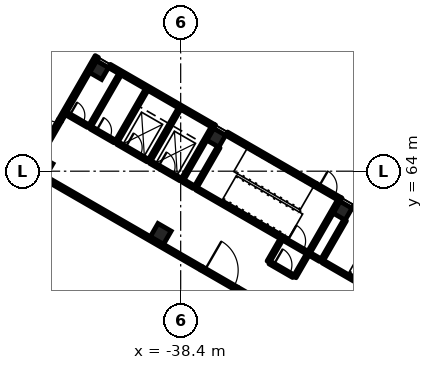
"""IFC4 building model, lengths in metres.
Left out: names, types, materials, properties, quantities, classifications, styles, units other than length and angle.
Written with IfcOpenShell. Run it as: python <this file> out.ifc"""

import sys

from ifc_helpers import new_model, si_unit, direction, frame, frame_2d, origin, origin_2d, place, context, subcontext, project, spatial, rectangle, extrude, element, fill, save


model = new_model("IFC4")
c1 = context("Model", 3, precision=1e-05, world=origin(), true_north=direction((0.0, 1.0)))
c2 = subcontext(c1, "Body", "Model", "MODEL_VIEW")
j1 = project(units=[si_unit("LENGTHUNIT", "METRE"), si_unit("PLANEANGLEUNIT", "RADIAN")], contexts=[c1])
p1 = place(None, origin())
s1 = spatial("IfcSite", under=j1, at=p1, CompositionType="ELEMENT")
p2 = place(p1, origin())
s2 = spatial("IfcBuilding", under=s1, at=p2, CompositionType="ELEMENT")
p3 = place(p2, origin())
s3 = spatial("IfcBuildingStorey", under=s2, at=p3, CompositionType="ELEMENT", Elevation=0.0)
for number, where, z_axis, x_axis in (
    (1, (-27.746, 61.399, -0.3), (0.0, 0.0, 1.0), (-0.5, -0.866, 0.0)),
    (2, (-36.06, 66.199, -0.3), (0.0, 0.0, 1.0), (-0.5, -0.866, 0.0)),
    (3, (-43.767, 70.649, -0.3), (0.0, 0.0, 1.0), (-0.5, -0.866, 0.0)),
):
    element("IfcColumn", number, at=place(p3, frame(where, z_axis=z_axis, x_axis=x_axis)), inside=s3, PredefinedType="COLUMN", context=c2, shape_type="SweptSolid", body=[
        extrude(rectangle(XDim=0.9, YDim=0.9, at=origin_2d()), origin(), (0.0, 0.0, 1.0), 6.3),
    ])
p4 = place(p3, frame((-39.71, 59.877, -0.3), z_axis=(0.0, 0.0, 1.0), x_axis=(-0.5, -0.866025403784, 0.0)))
e4 = element("IfcColumn", 4, at=p4, inside=s3, PredefinedType="COLUMN", context=c2, shape_type="SweptSolid", body=[
    extrude(rectangle(XDim=1.0, YDim=1.0, at=origin_2d()), origin(), (0.0, 0.0, 1.0), 6.3),
])
p5 = place(p3, frame((-47.417, 64.327, -0.3), z_axis=(0.0, 0.0, 1.0), x_axis=(-0.5, -0.866025403784, 0.0)))
e5 = element("IfcColumn", 5, at=p5, inside=s3, PredefinedType="COLUMN", context=c2, shape_type="SweptSolid", body=[
    extrude(rectangle(XDim=0.9, YDim=0.9, at=origin_2d()), origin(), (0.0, 0.0, 1.0), 6.3),
])
p6 = place(p3, frame((-36.719, 65.857, -1.5), z_axis=(0.0, 0.0, 1.0), x_axis=(-0.866020664882, 0.50000820793, 0.0)))
e6 = element("IfcWall", 6, at=p6, inside=s3, PredefinedType="SOLIDWALL", context=c2, shape_type="SweptSolid", body=[
    extrude(rectangle(XDim=5.3, YDim=0.25, at=frame_2d((2.65, 0.0))), origin(), (0.0, 0.0, 1.0), 1.2),
])
p7 = place(p3, frame((-38.194, 63.303, -1.5), z_axis=(0.0, 0.0, 1.0), x_axis=(-0.866029095148, 0.499993606316, 0.0)))
e7 = element("IfcWall", 7, at=p7, inside=s3, PredefinedType="SOLIDWALL", context=c2, shape_type="SweptSolid", body=[
    extrude(rectangle(XDim=5.3, YDim=0.25, at=frame_2d((2.65, 0.0))), origin(), (0.0, 0.0, 1.0), 1.2),
])
p8 = place(p3, frame((-36.889, 65.812, -1.5), z_axis=(0.0, 0.0, 1.0), x_axis=(-0.4999416173, -0.866059108428, 0.0)))
e8 = element("IfcWall", 8, at=p8, inside=s3, PredefinedType="SOLIDWALL", context=c2, shape_type="SweptSolid", body=[
    extrude(rectangle(XDim=2.7, YDim=0.25, at=frame_2d((1.35, 0.0))), origin(), (0.0, 0.0, 1.0), 1.2),
])
p9 = place(p3, frame((-41.263, 68.337, -1.5), z_axis=(0.0, 0.0, 1.0), x_axis=(-0.50000943426, -0.866019956843, 0.0)))
e9 = element("IfcWall", 9, at=p9, inside=s3, PredefinedType="SOLIDWALL", context=c2, shape_type="SweptSolid", body=[
    extrude(rectangle(XDim=2.7, YDim=0.25, at=frame_2d((1.35, 0.0))), origin(), (0.0, 0.0, 1.0), 1.2),
])
p10 = place(p3, frame((-46.34, 67.342, 0.0), z_axis=(0.0, 0.0, 1.0), x_axis=(0.500010041276, 0.866019606374, 0.0)))
e10 = element("IfcWall", 10, at=p10, inside=s3, PredefinedType="SOLIDWALL", context=c2, shape_type="SweptSolid", body=[
    extrude(rectangle(XDim=4.85, YDim=0.25, at=frame_2d((2.425, 0.0))), origin(), (0.0, 0.0, 1.0), 5.7),
])
p11 = place(p3, frame((-47.49, 65.35, 0.0), z_axis=(0.0, 0.0, 1.0), x_axis=(0.499952165731, 0.866053019151, 0.0)))
e11 = element("IfcWall", 11, at=p11, inside=s3, PredefinedType="SOLIDWALL", context=c2, shape_type="SweptSolid", body=[
    extrude(rectangle(XDim=2.3, YDim=0.25, at=frame_2d((1.15, 0.0))), origin(), (0.0, 0.0, 1.0), 5.7),
])
p12 = place(p11, frame((0.25, 0.0, 0.0)))
e12 = element("IfcOpeningElement", 12, at=p12, cuts=e11, PredefinedType="OPENING", context=c2, shape_type="SweptSolid", body=[
    extrude(rectangle(XDim=1.8, YDim=2.1, at=frame_2d((0.9, 1.05))), frame((0.0, 0.135, 0.0), z_axis=(0.0, -1.0, 0.0), x_axis=(1.0, 0.0, 0.0)), (0.0, 0.0, 1.0), 0.27),
])
p13 = place(p3, frame((-27.069, 61.672, 0.0), z_axis=(0.0, 0.0, 1.0), x_axis=(0.866026575979, -0.499997969693, 0.0)))
e13 = element("IfcWall", 13, at=p13, inside=s3, PredefinedType="SOLIDWALL", context=c2, shape_type="SweptSolid", body=[
    extrude(rectangle(XDim=6.75, YDim=0.25, at=frame_2d((3.375, 0.0))), origin(), (0.0, 0.0, 1.0), 5.7),
])
p14 = place(p3, frame((-29.537, 63.097, 0.0), z_axis=(0.0, 0.0, 1.0), x_axis=(0.866033964044, -0.499985172903, 0.0)))
e14 = element("IfcWall", 14, at=p14, inside=s3, PredefinedType="SOLIDWALL", context=c2, shape_type="SweptSolid", body=[
    extrude(rectangle(XDim=1.85, YDim=0.25, at=frame_2d((0.925, 0.0))), origin(), (0.0, 0.0, 1.0), 5.7),
])
p15 = place(p14, frame((0.25, 0.0, 0.0)))
e15 = element("IfcOpeningElement", 15, at=p15, cuts=e14, PredefinedType="OPENING", context=c2, shape_type="SweptSolid", body=[
    extrude(rectangle(XDim=1.2, YDim=2.1, at=frame_2d((0.6, 1.05))), frame((0.0, 0.135, 0.0), z_axis=(0.0, -1.0, 0.0), x_axis=(1.0, 0.0, 0.0)), (0.0, 0.0, 1.0), 0.27),
])
p16 = place(p3, frame((-35.383, 66.472, 0.0), z_axis=(0.0, 0.0, 1.0), x_axis=(0.866026575979, -0.499997969693, 0.0)))
e16 = element("IfcWall", 16, at=p16, inside=s3, PredefinedType="SOLIDWALL", context=c2, shape_type="SweptSolid", body=[
    extrude(rectangle(XDim=6.75, YDim=0.25, at=frame_2d((3.375, 0.0))), origin(), (0.0, 0.0, 1.0), 5.7),
])
p17 = place(p3, frame((-43.09, 70.922, 0.0), z_axis=(0.0, 0.0, 1.0), x_axis=(0.866026562566, -0.499997992926, 0.0)))
e17 = element("IfcWall", 17, at=p17, inside=s3, PredefinedType="SOLIDWALL", context=c2, shape_type="SweptSolid", body=[
    extrude(rectangle(XDim=7.9, YDim=0.25, at=frame_2d((3.95, 0.0))), origin(), (0.0, 0.0, 1.0), 5.7),
])
for number, where, z_axis, x_axis in (
    (18, (-27.935, 62.172, 0.0), (0.0, 0.0, 1.0), (0.866, -0.5, 0.0)),
    (19, (-36.249, 66.972, 0.0), (0.0, 0.0, 1.0), (0.866, -0.5, 0.0)),
):
    element("IfcWall", number, at=place(p3, frame(where, z_axis=z_axis, x_axis=x_axis)), inside=s3, PredefinedType="SOLIDWALL", context=c2, shape_type="SweptSolid", body=[
        extrude(rectangle(XDim=0.1, YDim=0.25, at=frame_2d((0.05, 0.0))), origin(), (0.0, 0.0, 1.0), 5.7),
    ])
p18 = place(p3, frame((-27.581, 60.784, 0.0), z_axis=(0.0, 0.0, 1.0), x_axis=(-0.49999285859, -0.86602952684, 0.0)))
e20 = element("IfcWall", 20, at=p18, inside=s3, PredefinedType="SOLIDWALL", context=c2, shape_type="SweptSolid", body=[
    extrude(rectangle(XDim=3.1, YDim=0.2, at=frame_2d((1.55, 0.0))), origin(), (0.0, 0.0, 1.0), 5.7),
])
p19 = place(p3, frame((-27.997, 62.063, 0.0), z_axis=(0.0, 0.0, 1.0), x_axis=(-0.49999894854, -0.866026010844, 0.0)))
e21 = element("IfcWall", 21, at=p19, inside=s3, PredefinedType="SOLIDWALL", context=c2, shape_type="SweptSolid", body=[
    extrude(rectangle(XDim=4.0, YDim=0.2, at=frame_2d((2.0, 0.0))), origin(), (0.0, 0.0, 1.0), 5.7),
])
p20 = place(p3, frame((-35.895, 65.584, 0.0), z_axis=(0.0, 0.0, 1.0), x_axis=(-0.500026960575, -0.86600983753, 0.0)))
e22 = element("IfcWall", 22, at=p20, inside=s3, PredefinedType="SOLIDWALL", context=c2, shape_type="SweptSolid", body=[
    extrude(rectangle(XDim=3.1, YDim=0.2, at=frame_2d((1.55, 0.0))), origin(), (0.0, 0.0, 1.0), 5.7),
])
p21 = place(p3, frame((-23.285, 54.724, 0.0), z_axis=(0.0, 0.0, 1.0), x_axis=(-0.866027239912, 0.49999681972, 0.0)))
e23 = element("IfcWall", 23, at=p21, inside=s3, PredefinedType="SOLIDWALL", context=c2, shape_type="SweptSolid", body=[
    extrude(rectangle(XDim=6.65, YDim=0.2, at=frame_2d((3.325, 0.0))), origin(), (0.0, 0.0, 1.0), 5.7),
])
p22 = place(p3, frame((-31.599, 59.524, 0.0), z_axis=(0.0, 0.0, 1.0), x_axis=(0.866036909293, -0.499980071345, 0.0)))
e24 = element("IfcWall", 24, at=p22, inside=s3, PredefinedType="SOLIDWALL", context=c2, shape_type="SweptSolid", body=[
    extrude(rectangle(XDim=1.75, YDim=0.2, at=frame_2d((0.875, 0.0))), origin(), (0.0, 0.0, 1.0), 5.7),
])
p23 = place(p22, frame((0.25, 0.0, 0.0)))
e25 = element("IfcOpeningElement", 25, at=p23, cuts=e24, PredefinedType="OPENING", context=c2, shape_type="SweptSolid", body=[
    extrude(rectangle(XDim=1.2, YDim=2.1, at=frame_2d((0.6, 1.05))), frame((0.0, 0.11, 0.0), z_axis=(0.0, -1.0, 0.0), x_axis=(1.0, 0.0, 0.0)), (0.0, 0.0, 1.0), 0.22),
])
p24 = place(p3, frame((-31.599, 59.524, 0.0), z_axis=(0.0, 0.0, 1.0), x_axis=(-0.866027239912, 0.49999681972, 0.0)))
e26 = element("IfcWall", 26, at=p24, inside=s3, PredefinedType="SOLIDWALL", context=c2, shape_type="SweptSolid", body=[
    extrude(rectangle(XDim=6.65, YDim=0.2, at=frame_2d((3.325, 0.0))), origin(), (0.0, 0.0, 1.0), 5.7),
])
for number, where, z_axis, x_axis in (
    (27, (-36.311, 66.864, 0.0), (0.0, 0.0, 1.0), (-0.5, -0.866, 0.0)),
    (28, (-38.476, 68.114, 0.0), (0.0, 0.0, 1.0), (-0.5, -0.866, 0.0)),
    (29, (-40.641, 69.364, 0.0), (0.0, 0.0, 1.0), (-0.5, -0.866, 0.0)),
):
    element("IfcWall", number, at=place(p3, frame(where, z_axis=z_axis, x_axis=x_axis)), inside=s3, PredefinedType="SOLIDWALL", context=c2, shape_type="SweptSolid", body=[
        extrude(rectangle(XDim=4.0, YDim=0.2, at=frame_2d((2.0, 0.0))), origin(), (0.0, 0.0, 1.0), 5.7),
    ])
p25 = place(p3, frame((-40.389, 64.599, 0.0), z_axis=(0.0, 0.0, 1.0), x_axis=(0.86602648383, -0.499998129301, 0.0)))
e30 = element("IfcWall", 30, at=p25, inside=s3, PredefinedType="SOLIDWALL", context=c2, shape_type="SweptSolid", body=[
    extrude(rectangle(XDim=2.3, YDim=0.2, at=frame_2d((1.15, 0.0))), origin(), (0.0, 0.0, 1.0), 5.7),
])
p26 = place(p25, frame((0.6, 0.0, 0.0)))
e31 = element("IfcOpeningElement", 31, at=p26, cuts=e30, PredefinedType="OPENING", context=c2, shape_type="SweptSolid", body=[
    extrude(rectangle(XDim=1.1, YDim=2.1, at=frame_2d((0.55, 1.05))), frame((0.0, 0.11, 0.0), z_axis=(0.0, -1.0, 0.0), x_axis=(1.0, 0.0, 0.0)), (0.0, 0.0, 1.0), 0.22),
])
p27 = place(p3, frame((-42.554, 65.849, 0.0), z_axis=(0.0, 0.0, 1.0), x_axis=(0.86602648383, -0.499998129301, 0.0)))
e32 = element("IfcWall", 32, at=p27, inside=s3, PredefinedType="SOLIDWALL", context=c2, shape_type="SweptSolid", body=[
    extrude(rectangle(XDim=2.3, YDim=0.2, at=frame_2d((1.15, 0.0))), origin(), (0.0, 0.0, 1.0), 5.7),
])
p28 = place(p27, frame((0.6, 0.0, 0.0)))
e33 = element("IfcOpeningElement", 33, at=p28, cuts=e32, PredefinedType="OPENING", context=c2, shape_type="SweptSolid", body=[
    extrude(rectangle(XDim=1.1, YDim=2.1, at=frame_2d((0.55, 1.05))), frame((0.0, 0.11, 0.0), z_axis=(0.0, -1.0, 0.0), x_axis=(1.0, 0.0, 0.0)), (0.0, 0.0, 1.0), 0.22),
])
for number, where, z_axis, x_axis in (
    (34, (-30.047, 58.513, 0.0), (0.0, 0.0, 1.0), (-0.5, -0.866, 0.0)),
    (35, (-31.779, 59.513, 0.0), (0.0, 0.0, 1.0), (-0.5, -0.866, 0.0)),
):
    element("IfcWall", number, at=place(p3, frame(where, z_axis=z_axis, x_axis=x_axis)), inside=s3, PredefinedType="PARTITIONING", context=c2, shape_type="SweptSolid", body=[
        extrude(rectangle(XDim=1.7, YDim=0.2, at=frame_2d((0.85, 0.0))), origin(), (0.0, 0.0, 1.0), 5.1),
    ])
p29 = place(p3, frame((-32.542, 57.99, 0.0), z_axis=(0.0, 0.0, 1.0), x_axis=(0.866047807691, -0.499961193289, 0.0)))
e36 = element("IfcWall", 36, at=p29, inside=s3, PredefinedType="PARTITIONING", context=c2, shape_type="SweptSolid", body=[
    extrude(rectangle(XDim=1.8, YDim=0.2, at=frame_2d((0.9, 0.0))), origin(), (0.0, 0.0, 1.0), 5.1),
])
p30 = place(p29, frame((0.3, 0.0, 0.0)))
e37 = element("IfcOpeningElement", 37, at=p30, cuts=e36, PredefinedType="OPENING", context=c2, shape_type="SweptSolid", body=[
    extrude(rectangle(XDim=1.2, YDim=2.1, at=frame_2d((0.6, 1.05))), frame((0.0, 0.11, 0.0), z_axis=(0.0, -1.0, 0.0), x_axis=(1.0, 0.0, 0.0)), (0.0, 0.0, 1.0), 0.22),
])
p31 = place(p3, frame((-28.72, 52.811, 0.0), z_axis=(0.0, 0.0, 1.0), x_axis=(-0.866028853923, 0.499994024137, 0.0)))
e38 = element("IfcWall", 38, at=p31, inside=s3, PredefinedType="SOLIDWALL", context=c2, shape_type="SweptSolid", body=[
    extrude(rectangle(XDim=6.9, YDim=0.25, at=frame_2d((3.45, 0.0))), origin(), (0.0, 0.0, 1.0), 5.1),
])
p32 = place(p3, frame((-37.034, 57.611, 0.0), z_axis=(0.0, 0.0, 1.0), x_axis=(0.866019956843, -0.50000943426, 0.0)))
e39 = element("IfcWall", 39, at=p32, inside=s3, PredefinedType="SOLIDWALL", context=c2, shape_type="SweptSolid", body=[
    extrude(rectangle(XDim=2.7, YDim=0.25, at=frame_2d((1.35, 0.0))), origin(), (0.0, 0.0, 1.0), 5.1),
])
p33 = place(p32, frame((0.25, 0.0, 0.0)))
e40 = element("IfcOpeningElement", 40, at=p33, cuts=e39, PredefinedType="OPENING", context=c2, shape_type="SweptSolid", body=[
    extrude(rectangle(XDim=2.2, YDim=2.1, at=frame_2d((1.1, 1.05))), frame((0.0, 0.135, 0.0), z_axis=(0.0, -1.0, 0.0), x_axis=(1.0, 0.0, 0.0)), (0.0, 0.0, 1.0), 0.27),
])
p34 = place(p3, frame((-37.034, 57.611, 0.0), z_axis=(0.0, 0.0, 1.0), x_axis=(-0.866025499775, 0.499999833739, 0.0)))
e41 = element("IfcWall", 41, at=p34, inside=s3, PredefinedType="SOLIDWALL", context=c2, shape_type="SweptSolid", body=[
    extrude(rectangle(XDim=12.8, YDim=0.25, at=frame_2d((6.4, 0.0))), origin(), (0.0, 0.0, 1.0), 5.1),
])
p35 = place(p3, frame((-42.395, 70.376, 0.0), z_axis=(0.0, 0.0, 1.0), x_axis=(-0.49999894854, -0.866026010844, 0.0)))
e42 = element("IfcWall", 42, at=p35, inside=s3, PredefinedType="PARTITIONING", context=c2, shape_type="SweptSolid", body=[
    extrude(rectangle(XDim=4.0, YDim=0.2, at=frame_2d((2.0, 0.0))), origin(), (0.0, 0.0, 1.0), 5.1),
])
p36 = place(p3, frame((-44.308, 66.862, 0.0), z_axis=(0.0, 0.0, 1.0), x_axis=(0.866036312054, -0.499981105847, 0.0)))
e43 = element("IfcWall", 43, at=p36, inside=s3, PredefinedType="PARTITIONING", context=c2, shape_type="SweptSolid", body=[
    extrude(rectangle(XDim=1.825, YDim=0.2, at=frame_2d((0.912, 0.0))), origin(), (0.0, 0.0, 1.0), 5.1),
])
p37 = place(p36, frame((0.413, 0.0, 0.0)))
e44 = element("IfcOpeningElement", 44, at=p37, cuts=e43, PredefinedType="OPENING", context=c2, shape_type="SweptSolid", body=[
    extrude(rectangle(XDim=1.0, YDim=2.1, at=frame_2d((0.5, 1.05))), frame((0.0, 0.11, 0.0), z_axis=(0.0, -1.0, 0.0), x_axis=(1.0, 0.0, 0.0)), (0.0, 0.0, 1.0), 0.22),
])
p38 = place(p3, frame((-45.932, 67.799, 0.0), z_axis=(0.0, 0.0, 1.0), x_axis=(0.866027799164, -0.499995851058, 0.0)))
e45 = element("IfcWall", 45, at=p38, inside=s3, PredefinedType="PARTITIONING", context=c2, shape_type="SweptSolid", body=[
    extrude(rectangle(XDim=1.675, YDim=0.2, at=frame_2d((0.837, 0.0))), origin(), (0.0, 0.0, 1.0), 5.1),
])
p39 = place(p38, frame((0.262, 0.0, 0.0)))
e46 = element("IfcOpeningElement", 46, at=p39, cuts=e45, PredefinedType="OPENING", context=c2, shape_type="SweptSolid", body=[
    extrude(rectangle(XDim=1.0, YDim=2.1, at=frame_2d((0.5, 1.05))), frame((0.0, 0.11, 0.0), z_axis=(0.0, -1.0, 0.0), x_axis=(1.0, 0.0, 0.0)), (0.0, 0.0, 1.0), 0.22),
])
p40 = place(p3, frame((-29.218, 58.149, 0.0), z_axis=(0.0, 0.0, 1.0), x_axis=(-0.866017831539, 0.500013115284, 0.0)))
e47 = element("IfcWall", 47, at=p40, inside=s3, PredefinedType="PARTITIONING", context=c2, shape_type="SweptSolid", body=[
    extrude(rectangle(XDim=0.8, YDim=0.2, at=frame_2d((0.4, 0.0))), origin(), (0.0, 0.0, 1.0), 5.1),
])
p41 = place(p3, frame((-37.531, 62.949, 0.0), z_axis=(0.0, 0.0, 1.0), x_axis=(-0.866094119867, 0.499880961361, 0.0)))
e48 = element("IfcWall", 48, at=p41, inside=s3, PredefinedType="PARTITIONING", context=c2, shape_type="SweptSolid", body=[
    extrude(rectangle(XDim=0.8, YDim=0.2, at=frame_2d((0.4, 0.0))), origin(), (0.0, 0.0, 1.0), 5.1),
])
p42 = place(p12, origin())
e49 = element("IfcDoor", 49, at=p42, inside=s3, OperationType="DOUBLE_DOOR_SINGLE_SWING", PredefinedType="DOOR", context=c2, shape_type="SweptSolid", body=[
    extrude(rectangle(XDim=1.8, YDim=2.1, at=frame_2d((0.9, 1.05))), frame((0.0, 0.025, 0.0), z_axis=(0.0, -1.0, 0.0), x_axis=(1.0, 0.0, 0.0)), (0.0, 0.0, 1.0), 0.05),
])
fill(e12, e49)
p43 = place(p15, origin())
e50 = element("IfcDoor", 50, at=p43, inside=s3, OperationType="SINGLE_SWING_LEFT", PredefinedType="DOOR", context=c2, shape_type="SweptSolid", body=[
    extrude(rectangle(XDim=1.2, YDim=2.1, at=frame_2d((0.6, 1.05))), frame((0.0, 0.025, 0.0), z_axis=(0.0, -1.0, 0.0), x_axis=(1.0, 0.0, 0.0)), (0.0, 0.0, 1.0), 0.05),
])
fill(e15, e50)
p44 = place(p23, origin())
e51 = element("IfcDoor", 51, at=p44, inside=s3, OperationType="SINGLE_SWING_LEFT", PredefinedType="DOOR", context=c2, shape_type="SweptSolid", body=[
    extrude(rectangle(XDim=1.2, YDim=2.1, at=frame_2d((0.6, 1.05))), frame((0.0, 0.025, 0.0), z_axis=(0.0, -1.0, 0.0), x_axis=(1.0, 0.0, 0.0)), (0.0, 0.0, 1.0), 0.05),
])
fill(e25, e51)
p45 = place(p26, origin())
e52 = element("IfcDoor", 52, at=p45, inside=s3, OperationType="DOUBLE_DOOR_SLIDING", PredefinedType="DOOR", context=c2, shape_type="SweptSolid", body=[
    extrude(rectangle(XDim=1.1, YDim=2.1, at=frame_2d((0.55, 1.05))), frame((0.0, 0.025, 0.0), z_axis=(0.0, -1.0, 0.0), x_axis=(1.0, 0.0, 0.0)), (0.0, 0.0, 1.0), 0.05),
])
fill(e31, e52)
p46 = place(p28, origin())
e53 = element("IfcDoor", 53, at=p46, inside=s3, OperationType="DOUBLE_DOOR_SLIDING", PredefinedType="DOOR", context=c2, shape_type="SweptSolid", body=[
    extrude(rectangle(XDim=1.1, YDim=2.1, at=frame_2d((0.55, 1.05))), frame((0.0, 0.025, 0.0), z_axis=(0.0, -1.0, 0.0), x_axis=(1.0, 0.0, 0.0)), (0.0, 0.0, 1.0), 0.05),
])
fill(e33, e53)
p47 = place(p30, origin())
e54 = element("IfcDoor", 54, at=p47, inside=s3, OperationType="SINGLE_SWING_LEFT", PredefinedType="DOOR", context=c2, shape_type="SweptSolid", body=[
    extrude(rectangle(XDim=1.2, YDim=2.1, at=frame_2d((0.6, 1.05))), frame((0.0, 0.025, 0.0), z_axis=(0.0, -1.0, 0.0), x_axis=(1.0, 0.0, 0.0)), (0.0, 0.0, 1.0), 0.05),
])
fill(e37, e54)
p48 = place(p33, origin())
e55 = element("IfcDoor", 55, at=p48, inside=s3, OperationType="DOUBLE_DOOR_SINGLE_SWING", PredefinedType="DOOR", context=c2, shape_type="SweptSolid", body=[
    extrude(rectangle(XDim=2.2, YDim=2.1, at=frame_2d((1.1, 1.05))), frame((0.0, 0.025, 0.0), z_axis=(0.0, -1.0, 0.0), x_axis=(1.0, 0.0, 0.0)), (0.0, 0.0, 1.0), 0.05),
])
fill(e40, e55)
p49 = place(p37, origin())
e56 = element("IfcDoor", 56, at=p49, inside=s3, OperationType="SINGLE_SWING_LEFT", PredefinedType="DOOR", context=c2, shape_type="SweptSolid", body=[
    extrude(rectangle(XDim=1.0, YDim=2.1, at=frame_2d((0.5, 1.05))), frame((0.0, 0.025, 0.0), z_axis=(0.0, -1.0, 0.0), x_axis=(1.0, 0.0, 0.0)), (0.0, 0.0, 1.0), 0.05),
])
fill(e44, e56)
p50 = place(p39, origin())
e57 = element("IfcDoor", 57, at=p50, inside=s3, OperationType="SINGLE_SWING_LEFT", PredefinedType="DOOR", context=c2, shape_type="SweptSolid", body=[
    extrude(rectangle(XDim=1.0, YDim=2.1, at=frame_2d((0.5, 1.05))), frame((0.0, 0.025, 0.0), z_axis=(0.0, -1.0, 0.0), x_axis=(1.0, 0.0, 0.0)), (0.0, 0.0, 1.0), 0.05),
])
fill(e46, e57)
save(model, sys.argv[1])
